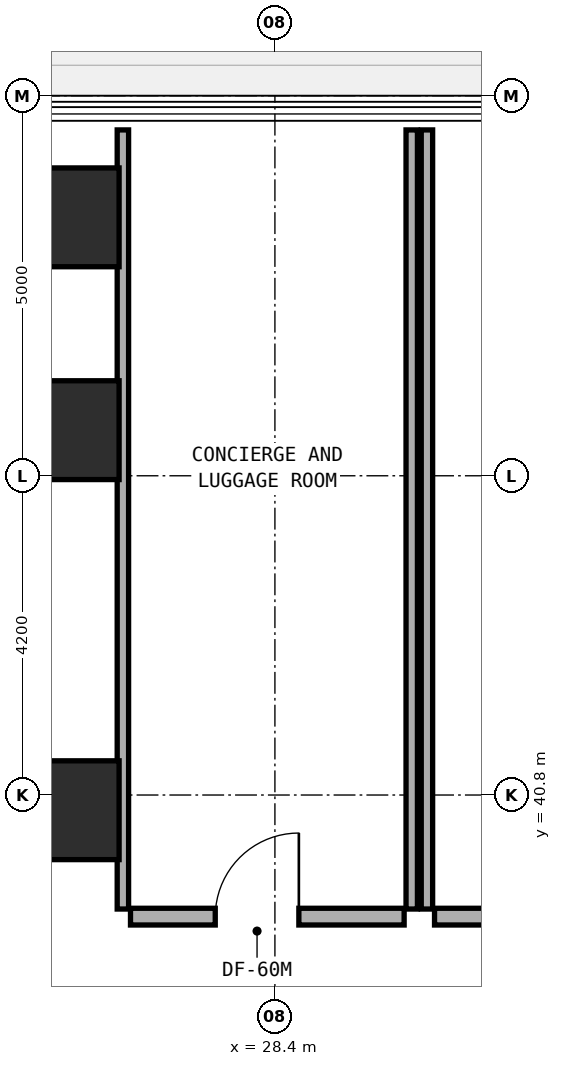
"""IFC4 building model, lengths in metres.
Left out: names, types, materials, properties, quantities, classifications, styles, units other than length and angle.
Written with IfcOpenShell. Run it as: python <this file> out.ifc"""

import sys

from ifc_helpers import new_model, si_unit, direction, frame, frame_2d, origin, origin_2d, place, context, subcontext, project, spatial, rectangle, extrude, element, fill, save


model = new_model("IFC4")
c1 = context("Model", 3, precision=1e-05, world=origin(), true_north=direction((0.0, 1.0)))
c2 = subcontext(c1, "Body", "Model", "MODEL_VIEW")
j1 = project(units=[si_unit("LENGTHUNIT", "METRE"), si_unit("PLANEANGLEUNIT", "RADIAN")], contexts=[c1])
p1 = place(None, origin())
s1 = spatial("IfcSite", under=j1, at=p1, CompositionType="ELEMENT")
p2 = place(p1, origin())
s2 = spatial("IfcBuilding", under=s1, at=p2, CompositionType="ELEMENT")
p3 = place(p2, origin())
s3 = spatial("IfcBuildingStorey", under=s2, at=p3, CompositionType="ELEMENT", Elevation=0.0)
for number, where, z_axis, x_axis in (
    (1, (25.8, 40.6, 0.0), (0.0, 0.0, 1.0), (1.0, 0.0, 0.0)),
    (2, (25.8, 48.4, 0.0), (0.0, 0.0, 1.0), (1.0, 0.0, 0.0)),
    (3, (25.8, 45.6, 0.0), (0.0, 0.0, 1.0), (1.0, 0.0, 0.0)),
):
    element("IfcColumn", number, at=place(p3, frame(where, z_axis=z_axis, x_axis=x_axis)), inside=s3, PredefinedType="COLUMN", context=c2, shape_type="SweptSolid", body=[
        extrude(rectangle(XDim=1.1, YDim=1.3, at=origin_2d()), origin(), (0.0, 0.0, 1.0), 5.4),
    ])
p4 = place(p3, frame((26.4, 39.3, 0.0), z_axis=(0.0, 0.0, 1.0), x_axis=(0.0, 1.0, 0.0)))
e4 = element("IfcWall", 4, at=p4, inside=s3, PredefinedType="PARTITIONING", context=c2, shape_type="SweptSolid", body=[
    extrude(rectangle(XDim=10.25, YDim=0.15, at=frame_2d((5.125, 0.0))), origin(), (0.0, 0.0, 1.0), 4.125),
])
p5 = place(p3, frame((30.2, 39.3, 0.0), z_axis=(0.0, 0.0, 1.0), x_axis=(0.0, 1.0, 0.0)))
e5 = element("IfcWall", 5, at=p5, inside=s3, PredefinedType="PARTITIONING", context=c2, shape_type="SweptSolid", body=[
    extrude(rectangle(XDim=10.25, YDim=0.15, at=frame_2d((5.125, 0.0))), origin(), (0.0, 0.0, 1.0), 4.225),
])
p6 = place(p3, frame((26.5, 39.2, 0.0), z_axis=(0.0, 0.0, 1.0), x_axis=(1.0, 0.0, 0.0)))
e6 = element("IfcWall", 6, at=p6, inside=s3, PredefinedType="SOLIDWALL", context=c2, shape_type="SweptSolid", body=[
    extrude(rectangle(XDim=3.6, YDim=0.22, at=frame_2d((1.8, 0.0))), origin(), (0.0, 0.0, 1.0), 5.05),
])
p7 = place(p6, frame((1.115, 0.0, 0.0)))
e7 = element("IfcOpeningElement", 7, at=p7, cuts=e6, PredefinedType="OPENING", context=c2, shape_type="SweptSolid", body=[
    extrude(rectangle(XDim=1.1, YDim=2.1, at=frame_2d((0.55, 1.05))), frame((0.0, 0.12, 0.0), z_axis=(0.0, -1.0, 0.0), x_axis=(1.0, 0.0, 0.0)), (0.0, 0.0, 1.0), 0.24),
])
p8 = place(p3, frame((30.4, 39.3, 0.0), z_axis=(0.0, 0.0, 1.0), x_axis=(0.0, 1.0, 0.0)))
e8 = element("IfcWall", 8, at=p8, inside=s3, PredefinedType="PARTITIONING", context=c2, shape_type="SweptSolid", body=[
    extrude(rectangle(XDim=10.25, YDim=0.15, at=frame_2d((5.125, 0.0))), origin(), (0.0, 0.0, 1.0), 4.225),
])
p9 = place(p3, frame((30.5, 39.2, 0.0), z_axis=(0.0, 0.0, 1.0), x_axis=(1.0, 0.0, 0.0)))
e9 = element("IfcWall", 9, at=p9, inside=s3, PredefinedType="SOLIDWALL", context=c2, shape_type="SweptSolid", body=[
    extrude(rectangle(XDim=32.4, YDim=0.22, at=frame_2d((16.2, 0.0))), origin(), (0.0, 0.0, 1.0), 4.325),
])
p10 = place(p9, frame((14.075, 0.0, 0.0)))
e10 = element("IfcOpeningElement", 10, at=p10, cuts=e9, PredefinedType="OPENING", context=c2, shape_type="SweptSolid", body=[
    extrude(rectangle(XDim=1.1, YDim=2.1, at=frame_2d((0.55, 1.05))), frame((0.0, 0.12, 0.0), z_axis=(0.0, -1.0, 0.0), x_axis=(1.0, 0.0, 0.0)), (0.0, 0.0, 1.0), 0.24),
])
p11 = place(p7, origin())
e11 = element("IfcDoor", 11, at=p11, inside=s3, OperationType="SINGLE_SWING_RIGHT", PredefinedType="DOOR", context=c2, shape_type="SweptSolid", body=[
    extrude(rectangle(XDim=1.1, YDim=2.1, at=frame_2d((0.55, 1.05))), frame((0.0, 0.025, 0.0), z_axis=(0.0, -1.0, 0.0), x_axis=(1.0, 0.0, 0.0)), (0.0, 0.0, 1.0), 0.05),
])
fill(e7, e11)
save(model, sys.argv[1])
